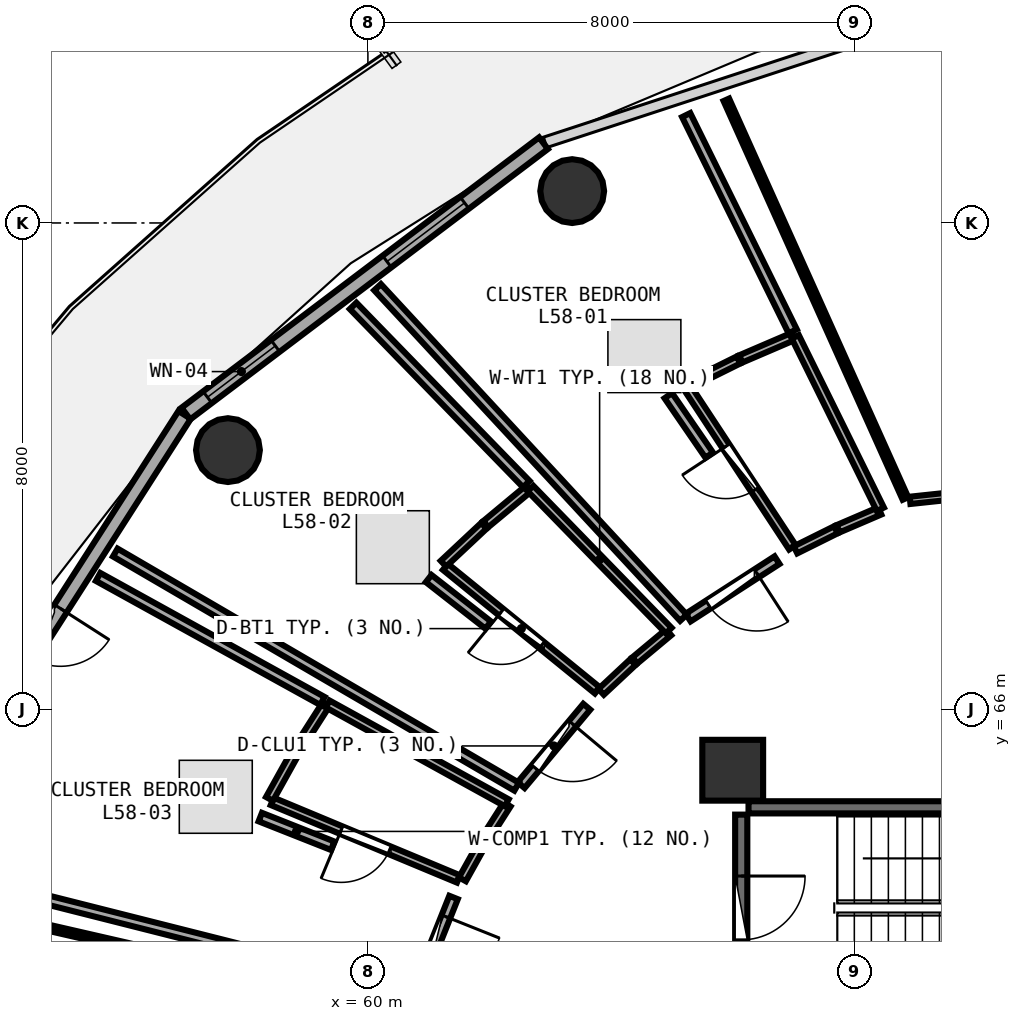
"""IFC4 building model, lengths in metres.
Left out: names, types, materials, properties, quantities, classifications, styles, units other than length and angle.
Written with IfcOpenShell. Run it as: python <this file> out.ifc"""

import sys

from ifc_helpers import new_model, si_unit, direction, frame, frame_2d, origin, origin_2d, place, context, subcontext, project, spatial, rectangle, circle, extrude, element, fill, save


model = new_model("IFC4")
c1 = context("Model", 3, precision=1e-05, world=origin(), true_north=direction((0.0, 1.0)))
c2 = subcontext(c1, "Body", "Model", "MODEL_VIEW")
j1 = project(units=[si_unit("LENGTHUNIT", "METRE"), si_unit("PLANEANGLEUNIT", "RADIAN")], contexts=[c1])
p1 = place(None, origin())
s1 = spatial("IfcSite", under=j1, at=p1, CompositionType="ELEMENT")
p2 = place(p1, origin())
s2 = spatial("IfcBuilding", under=s1, at=p2, CompositionType="ELEMENT")
p3 = place(p2, frame((0.0, 0.0, 226.95)))
s3 = spatial("IfcBuildingStorey", under=s2, at=p3, CompositionType="ELEMENT", Elevation=226.95)
p4 = place(p3, frame((66.0, 65.0, 0.0), z_axis=(0.0, 0.0, 1.0), x_axis=(1.0, 0.0, 0.0)))
e1 = element("IfcColumn", 1, at=p4, inside=s3, PredefinedType="PILASTER", context=c2, shape_type="SweptSolid", body=[
    extrude(rectangle(XDim=1.0, YDim=1.0, at=origin_2d()), origin(), (0.0, 0.0, 1.0), 3.75),
])
for number, where, z_axis, x_axis in (
    (2, (63.36, 74.524, 0.0), (0.0, 0.0, 1.0), (1.0, 0.0, 0.0)),
    (3, (57.698, 70.264, 0.0), (0.0, 0.0, 1.0), (1.0, 0.0, 0.0)),
):
    element("IfcColumn", number, at=place(p3, frame(where, z_axis=z_axis, x_axis=x_axis)), inside=s3, PredefinedType="COLUMN", context=c2, shape_type="SweptSolid", body=[
        extrude(circle(Radius=0.525, at=origin_2d()), origin(), (0.0, 0.0, 1.0), 3.75),
    ])
p5 = place(p3, frame((62.888, 75.312, 0.0), z_axis=(0.0, 0.0, 1.0), x_axis=(-0.797701674595, -0.603052268338, 0.0)))
e4 = element("IfcWall", 4, at=p5, inside=s3, PredefinedType="SOLIDWALL", context=c2, shape_type="SweptSolid", body=[
    extrude(rectangle(XDim=7.374, YDim=0.24, at=frame_2d((3.687, 0.0))), origin(), (0.0, 0.0, 1.0), 3.475),
])
p6 = place(p5, frame((1.627, 0.0, 0.85)))
e5 = element("IfcOpeningElement", 5, at=p6, cuts=e4, PredefinedType="OPENING", context=c2, shape_type="SweptSolid", body=[
    extrude(rectangle(XDim=1.6, YDim=1.45, at=frame_2d((0.8, 0.725))), frame((0.0, 0.13, 0.0), z_axis=(0.0, -1.0, 0.0), x_axis=(1.0, 0.0, 0.0)), (0.0, 0.0, 1.0), 0.26),
])
p7 = place(p5, frame((5.528, 0.0, 0.85)))
e6 = element("IfcOpeningElement", 6, at=p7, cuts=e4, PredefinedType="OPENING", context=c2, shape_type="SweptSolid", body=[
    extrude(rectangle(XDim=1.4, YDim=1.45, at=frame_2d((0.7, 0.725))), frame((0.0, 0.13, 0.0), z_axis=(0.0, -1.0, 0.0), x_axis=(1.0, 0.0, 0.0)), (0.0, 0.0, 1.0), 0.26),
])
p8 = place(p3, frame((56.986, 70.843, 0.0), z_axis=(0.0, 0.0, 1.0), x_axis=(-0.539539512973, -0.841960280501, 0.0)))
e7 = element("IfcWall", 7, at=p8, inside=s3, PredefinedType="SOLIDWALL", context=c2, shape_type="SweptSolid", body=[
    extrude(rectangle(XDim=7.115, YDim=0.24, at=frame_2d((3.557, 0.0))), origin(), (0.0, 0.0, 1.0), 3.475),
])
p9 = place(p8, frame((3.782, 0.0, 0.0)))
e8 = element("IfcOpeningElement", 8, at=p9, cuts=e7, PredefinedType="OPENING", context=c2, shape_type="SweptSolid", body=[
    extrude(rectangle(XDim=0.95, YDim=2.1, at=frame_2d((0.475, 1.05))), frame((0.0, 0.13, 0.0), z_axis=(0.0, -1.0, 0.0), x_axis=(1.0, 0.0, 0.0)), (0.0, 0.0, 1.0), 0.26),
])
p10 = place(p8, frame((5.082, 0.0, 0.85)))
e9 = element("IfcOpeningElement", 9, at=p10, cuts=e7, PredefinedType="OPENING", context=c2, shape_type="SweptSolid", body=[
    extrude(rectangle(XDim=1.2, YDim=1.45, at=frame_2d((0.6, 0.725))), frame((0.0, 0.13, 0.0), z_axis=(0.0, -1.0, 0.0), x_axis=(1.0, 0.0, 0.0)), (0.0, 0.0, 1.0), 0.26),
])
p11 = place(p3, frame((73.42, 64.39, 0.0), z_axis=(0.0, 0.0, 1.0), x_axis=(-1.0, 0.0, 0.0)))
e10 = element("IfcWall", 10, at=p11, inside=s3, PredefinedType="SHEAR", context=c2, shape_type="SweptSolid", body=[
    extrude(rectangle(XDim=7.16, YDim=0.2, at=frame_2d((3.58, 0.0))), origin(), (0.0, 0.0, 1.0), 3.49),
])
p12 = place(p3, frame((66.14, 64.27, 0.0), z_axis=(0.0, 0.0, 1.0), x_axis=(0.0, -1.0, 0.0)))
e11 = element("IfcWall", 11, at=p12, inside=s3, PredefinedType="SHEAR", context=c2, shape_type="SweptSolid", body=[
    extrude(rectangle(XDim=3.07, YDim=0.2, at=frame_2d((1.535, 0.0))), origin(), (0.0, 0.0, 1.0), 3.49),
])
p13 = place(p12, frame((1.01, 0.0, 0.0)))
e12 = element("IfcOpeningElement", 12, at=p13, cuts=e11, PredefinedType="OPENING", context=c2, shape_type="SweptSolid", body=[
    extrude(rectangle(XDim=1.05, YDim=2.1, at=frame_2d((0.525, 1.05))), frame((0.0, 0.11, 0.0), z_axis=(0.0, -1.0, 0.0), x_axis=(1.0, 0.0, 0.0)), (0.0, 0.0, 1.0), 0.22),
])
p14 = place(p3, frame((75.969, 70.189, 0.0), z_axis=(0.0, 0.0, 1.0), x_axis=(-0.994385599796, -0.105817195755, 0.0)))
e13 = element("IfcWall", 13, at=p14, inside=s3, PredefinedType="PARTITIONING", context=c2, shape_type="SweptSolid", body=[
    extrude(rectangle(XDim=7.092, YDim=0.12, at=frame_2d((3.546, 0.0))), origin(), (0.0, 0.0, 1.0), 3.025),
])
p15 = place(p14, frame((3.096, 0.0, 0.0)))
e14 = element("IfcOpeningElement", 14, at=p15, cuts=e13, PredefinedType="OPENING", context=c2, shape_type="SweptSolid", body=[
    extrude(rectangle(XDim=0.9, YDim=2.08, at=frame_2d((0.45, 1.04))), frame((0.0, 0.07, 0.0), z_axis=(0.0, -1.0, 0.0), x_axis=(1.0, 0.0, 0.0)), (0.0, 0.0, 1.0), 0.14),
])
p16 = place(p3, frame((66.982, 68.665, 0.0), z_axis=(0.0, 0.0, 1.0), x_axis=(-0.549630881336, 0.835407621632, 0.0)))
e15 = element("IfcWall", 15, at=p16, inside=s3, PredefinedType="PLUMBINGWALL", context=c2, shape_type="SweptSolid", body=[
    extrude(rectangle(XDim=3.118, YDim=0.13, at=frame_2d((1.559, 0.0))), origin(), (0.0, 0.0, 1.0), 3.175),
])
p17 = place(p16, frame((1.129, 0.0, 0.0)))
e16 = element("IfcOpeningElement", 16, at=p17, cuts=e15, PredefinedType="OPENING", context=c2, shape_type="SweptSolid", body=[
    extrude(rectangle(XDim=0.86, YDim=2.05, at=frame_2d((0.43, 1.025))), frame((0.0, 0.075, 0.0), z_axis=(0.0, -1.0, 0.0), x_axis=(1.0, 0.0, 0.0)), (0.0, 0.0, 1.0), 0.15),
])
p18 = place(p3, frame((66.729, 68.454, 0.0), z_axis=(0.0, 0.0, 1.0), x_axis=(-0.839995400075, -0.542593519915, 0.0)))
e17 = element("IfcWall", 17, at=p18, inside=s3, PredefinedType="PARTITIONING", context=c2, shape_type="SweptSolid", body=[
    extrude(rectangle(XDim=1.74, YDim=0.15, at=frame_2d((0.87, 0.0))), origin(), (0.0, 0.0, 1.0), 3.025),
])
p19 = place(p18, frame((0.395, 0.0, 0.0)))
e18 = element("IfcOpeningElement", 18, at=p19, cuts=e17, PredefinedType="OPENING", context=c2, shape_type="SweptSolid", body=[
    extrude(rectangle(XDim=0.95, YDim=2.08, at=frame_2d((0.475, 1.04))), frame((0.0, 0.085, 0.0), z_axis=(0.0, -1.0, 0.0), x_axis=(1.0, 0.0, 0.0)), (0.0, 0.0, 1.0), 0.17),
])
p20 = place(p3, frame((63.774, 66.313, 0.0), z_axis=(0.0, 0.0, 1.0), x_axis=(-0.775898386577, 0.630857902945, 0.0)))
e19 = element("IfcWall", 19, at=p20, inside=s3, PredefinedType="PLUMBINGWALL", context=c2, shape_type="SweptSolid", body=[
    extrude(rectangle(XDim=3.222, YDim=0.13, at=frame_2d((1.611, 0.0))), origin(), (0.0, 0.0, 1.0), 3.025),
])
p21 = place(p20, frame((1.181, 0.0, 0.0)))
e20 = element("IfcOpeningElement", 20, at=p21, cuts=e19, PredefinedType="OPENING", context=c2, shape_type="SweptSolid", body=[
    extrude(rectangle(XDim=0.86, YDim=2.05, at=frame_2d((0.43, 1.025))), frame((0.0, 0.075, 0.0), z_axis=(0.0, -1.0, 0.0), x_axis=(1.0, 0.0, 0.0)), (0.0, 0.0, 1.0), 0.15),
])
p22 = place(p3, frame((63.6, 66.044, 0.0), z_axis=(0.0, 0.0, 1.0), x_axis=(-0.642238304801, -0.766505029238, 0.0)))
e21 = element("IfcWall", 21, at=p22, inside=s3, PredefinedType="PARTITIONING", context=c2, shape_type="SweptSolid", body=[
    extrude(rectangle(XDim=1.682, YDim=0.15, at=frame_2d((0.841, 0.0))), origin(), (0.0, 0.0, 1.0), 3.025),
])
p23 = place(p22, frame((0.366, 0.0, 0.0)))
e22 = element("IfcOpeningElement", 22, at=p23, cuts=e21, PredefinedType="OPENING", context=c2, shape_type="SweptSolid", body=[
    extrude(rectangle(XDim=0.95, YDim=2.08, at=frame_2d((0.475, 1.04))), frame((0.0, 0.085, 0.0), z_axis=(0.0, -1.0, 0.0), x_axis=(1.0, 0.0, 0.0)), (0.0, 0.0, 1.0), 0.17),
])
p24 = place(p3, frame((61.49, 63.212, 0.0), z_axis=(0.0, 0.0, 1.0), x_axis=(-0.923098696922, 0.38456312322, 0.0)))
e23 = element("IfcWall", 23, at=p24, inside=s3, PredefinedType="PLUMBINGWALL", context=c2, shape_type="SweptSolid", body=[
    extrude(rectangle(XDim=3.317, YDim=0.13, at=frame_2d((1.659, 0.0))), origin(), (0.0, 0.0, 1.0), 3.175),
])
p25 = place(p24, frame((1.229, 0.0, 0.0)))
e24 = element("IfcOpeningElement", 24, at=p25, cuts=e23, PredefinedType="OPENING", context=c2, shape_type="SweptSolid", body=[
    extrude(rectangle(XDim=0.86, YDim=2.05, at=frame_2d((0.43, 1.025))), frame((0.0, 0.075, 0.0), z_axis=(0.0, -1.0, 0.0), x_axis=(1.0, 0.0, 0.0)), (0.0, 0.0, 1.0), 0.15),
])
p26 = place(p3, frame((61.409, 62.907, 0.0), z_axis=(0.0, 0.0, 1.0), x_axis=(-0.370667853418, -0.928765493783, 0.0)))
e25 = element("IfcWall", 25, at=p26, inside=s3, PredefinedType="PARTITIONING", context=c2, shape_type="SweptSolid", body=[
    extrude(rectangle(XDim=1.631, YDim=0.15, at=frame_2d((0.815, 0.0))), origin(), (0.0, 0.0, 1.0), 3.235),
])
p27 = place(p26, frame((0.34, 0.0, 0.0)))
e26 = element("IfcOpeningElement", 26, at=p27, cuts=e25, PredefinedType="OPENING", context=c2, shape_type="SweptSolid", body=[
    extrude(rectangle(XDim=0.95, YDim=2.08, at=frame_2d((0.475, 1.04))), frame((0.0, 0.085, 0.0), z_axis=(0.0, -1.0, 0.0), x_axis=(1.0, 0.0, 0.0)), (0.0, 0.0, 1.0), 0.17),
])
p28 = place(p3, frame((68.841, 69.469, 0.0), z_axis=(0.0, 0.0, 1.0), x_axis=(-0.409724811959, 0.912209174732, 0.0)))
e27 = element("IfcWall", 27, at=p28, inside=s3, PredefinedType="PARTITIONING", context=c2, shape_type="SweptSolid", body=[
    extrude(rectangle(XDim=7.188, YDim=0.1, at=frame_2d((3.594, 0.0))), origin(), (0.0, 0.0, 1.0), 3.075),
])
p29 = place(p3, frame((68.419, 69.265, 0.0), z_axis=(0.0, 0.0, 1.0), x_axis=(-0.918907807653, -0.394472357756, 0.0)))
e28 = element("IfcWall", 28, at=p29, inside=s3, PredefinedType="PLUMBINGWALL", context=c2, shape_type="SweptSolid", body=[
    extrude(rectangle(XDim=0.746, YDim=0.13, at=frame_2d((0.373, 0.0))), origin(), (0.0, 0.0, 1.0), 3.235),
])
p30 = place(p3, frame((67.697, 68.954, 0.0), z_axis=(0.0, 0.0, 1.0), x_axis=(-0.895346972175, -0.445369284321, 0.0)))
e29 = element("IfcWall", 29, at=p30, inside=s3, PredefinedType="PLUMBINGWALL", context=c2, shape_type="SweptSolid", body=[
    extrude(rectangle(XDim=0.742, YDim=0.13, at=frame_2d((0.371, 0.0))), origin(), (0.0, 0.0, 1.0), 3.235),
])
p31 = place(p3, frame((65.253, 71.329, 0.0), z_axis=(0.0, 0.0, 1.0), x_axis=(0.895874963303, 0.444306257133, 0.0)))
e30 = element("IfcWall", 30, at=p31, inside=s3, PredefinedType="PLUMBINGWALL", context=c2, shape_type="SweptSolid", body=[
    extrude(rectangle(XDim=0.941, YDim=0.13, at=frame_2d((0.471, 0.0))), origin(), (0.0, 0.0, 1.0), 3.48),
])
p32 = place(p3, frame((66.132, 71.764, 0.0), z_axis=(0.0, 0.0, 1.0), x_axis=(0.918877881794, 0.394542061573, 0.0)))
e31 = element("IfcWall", 31, at=p32, inside=s3, PredefinedType="PLUMBINGWALL", context=c2, shape_type="SweptSolid", body=[
    extrude(rectangle(XDim=0.946, YDim=0.13, at=frame_2d((0.473, 0.0))), origin(), (0.0, 0.0, 1.0), 3.48),
])
p33 = place(p3, frame((67.029, 72.127, 0.0), z_axis=(0.0, 0.0, 1.0), x_axis=(0.442483009424, -0.896776887732, 0.0)))
e32 = element("IfcWall", 32, at=p33, inside=s3, PredefinedType="PLUMBINGWALL", context=c2, shape_type="SweptSolid", body=[
    extrude(rectangle(XDim=3.163, YDim=0.13, at=frame_2d((1.581, 0.0))), origin(), (0.0, 0.0, 1.0), 3.175),
])
p34 = place(p3, frame((65.19, 67.507, 0.0), z_axis=(0.0, 0.0, 1.0), x_axis=(-0.679184519722, 0.733967566157, 0.0)))
e33 = element("IfcWall", 33, at=p34, inside=s3, PredefinedType="PARTITIONING", context=c2, shape_type="SweptSolid", body=[
    extrude(rectangle(XDim=7.407, YDim=0.15, at=frame_2d((3.703, 0.0))), origin(), (0.0, 0.0, 1.0), 3.025),
])
p35 = place(p3, frame((65.235, 75.774, 0.0), z_axis=(0.0, 0.0, 1.0), x_axis=(0.441884590329, -0.897071908394, 0.0)))
e34 = element("IfcWall", 34, at=p35, inside=s3, PredefinedType="PARTITIONING", context=c2, shape_type="SweptSolid", body=[
    extrude(rectangle(XDim=3.964, YDim=0.15, at=frame_2d((1.982, 0.0))), origin(), (0.0, 0.0, 1.0), 3.075),
])
p36 = place(p3, frame((64.941, 71.16, 0.0), z_axis=(0.0, 0.0, 1.0), x_axis=(0.566694618131, -0.823927915403, 0.0)))
e35 = element("IfcWall", 35, at=p36, inside=s3, PredefinedType="PARTITIONING", context=c2, shape_type="SweptSolid", body=[
    extrude(rectangle(XDim=1.187, YDim=0.15, at=frame_2d((0.594, 0.0))), origin(), (0.0, 0.0, 1.0), 3.175),
])
p37 = place(p3, frame((64.947, 67.269, 0.0), z_axis=(0.0, 0.0, 1.0), x_axis=(-0.768276565134, -0.640118051196, 0.0)))
e36 = element("IfcWall", 36, at=p37, inside=s3, PredefinedType="PLUMBINGWALL", context=c2, shape_type="SweptSolid", body=[
    extrude(rectangle(XDim=0.724, YDim=0.13, at=frame_2d((0.362, 0.0))), origin(), (0.0, 0.0, 1.0), 3.48),
])
p38 = place(p3, frame((64.36, 66.779, 0.0), z_axis=(0.0, 0.0, 1.0), x_axis=(-0.73050113357, -0.682911483175, 0.0)))
e37 = element("IfcWall", 37, at=p38, inside=s3, PredefinedType="PLUMBINGWALL", context=c2, shape_type="SweptSolid", body=[
    extrude(rectangle(XDim=0.718, YDim=0.13, at=frame_2d((0.359, 0.0))), origin(), (0.0, 0.0, 1.0), 3.025),
])
p39 = place(p3, frame((61.243, 68.397, 0.0), z_axis=(0.0, 0.0, 1.0), x_axis=(0.729879325393, 0.683576016522, 0.0)))
e38 = element("IfcWall", 38, at=p39, inside=s3, PredefinedType="PLUMBINGWALL", context=c2, shape_type="SweptSolid", body=[
    extrude(rectangle(XDim=0.912, YDim=0.13, at=frame_2d((0.456, 0.0))), origin(), (0.0, 0.0, 1.0), 3.175),
])
p40 = place(p3, frame((61.938, 69.047, 0.0), z_axis=(0.0, 0.0, 1.0), x_axis=(0.768743942807, 0.639556682709, 0.0)))
e39 = element("IfcWall", 39, at=p40, inside=s3, PredefinedType="PLUMBINGWALL", context=c2, shape_type="SweptSolid", body=[
    extrude(rectangle(XDim=0.918, YDim=0.13, at=frame_2d((0.459, 0.0))), origin(), (0.0, 0.0, 1.0), 3.175),
])
p41 = place(p3, frame((62.674, 69.633, 0.0), z_axis=(0.0, 0.0, 1.0), x_axis=(0.697495291355, -0.716589365353, 0.0)))
e40 = element("IfcWall", 40, at=p41, inside=s3, PredefinedType="PLUMBINGWALL", context=c2, shape_type="SweptSolid", body=[
    extrude(rectangle(XDim=3.26, YDim=0.13, at=frame_2d((1.63, 0.0))), origin(), (0.0, 0.0, 1.0), 3.175),
])
p42 = place(p3, frame((62.446, 64.729, 0.0), z_axis=(0.0, 0.0, 1.0), x_axis=(-0.863764995437, 0.503894862703, 0.0)))
e41 = element("IfcWall", 41, at=p42, inside=s3, PredefinedType="PARTITIONING", context=c2, shape_type="SweptSolid", body=[
    extrude(rectangle(XDim=7.642, YDim=0.15, at=frame_2d((3.821, 0.0))), origin(), (0.0, 0.0, 1.0), 3.025),
])
p43 = place(p3, frame((59.757, 72.636, 0.0), z_axis=(0.0, 0.0, 1.0), x_axis=(0.696968329913, -0.717101908447, 0.0)))
e42 = element("IfcWall", 42, at=p43, inside=s3, PredefinedType="PARTITIONING", context=c2, shape_type="SweptSolid", body=[
    extrude(rectangle(XDim=4.086, YDim=0.15, at=frame_2d((2.043, 0.0))), origin(), (0.0, 0.0, 1.0), 3.075),
])
p44 = place(p3, frame((61.0, 68.152, 0.0), z_axis=(0.0, 0.0, 1.0), x_axis=(0.787890342656, -0.615815563257, 0.0)))
e43 = element("IfcWall", 43, at=p44, inside=s3, PredefinedType="PARTITIONING", context=c2, shape_type="SweptSolid", body=[
    extrude(rectangle(XDim=1.243, YDim=0.15, at=frame_2d((0.622, 0.0))), origin(), (0.0, 0.0, 1.0), 3.025),
])
p45 = place(p3, frame((62.291, 64.438, 0.0), z_axis=(0.0, 0.0, 1.0), x_axis=(-0.538677920136, -0.842511779359, 0.0)))
e44 = element("IfcWall", 44, at=p45, inside=s3, PredefinedType="PLUMBINGWALL", context=c2, shape_type="SweptSolid", body=[
    extrude(rectangle(XDim=0.701, YDim=0.13, at=frame_2d((0.35, 0.0))), origin(), (0.0, 0.0, 1.0), 3.48),
])
p46 = place(p3, frame((61.893, 63.813, 0.0), z_axis=(0.0, 0.0, 1.0), x_axis=(-0.487222889134, -0.873277651325, 0.0)))
e45 = element("IfcWall", 45, at=p46, inside=s3, PredefinedType="PLUMBINGWALL", context=c2, shape_type="SweptSolid", body=[
    extrude(rectangle(XDim=0.695, YDim=0.13, at=frame_2d((0.348, 0.0))), origin(), (0.0, 0.0, 1.0), 3.48),
])
p47 = place(p3, frame((58.382, 64.529, 0.0), z_axis=(0.0, 0.0, 1.0), x_axis=(0.486816740093, 0.873504127961, 0.0)))
e46 = element("IfcWall", 46, at=p47, inside=s3, PredefinedType="PLUMBINGWALL", context=c2, shape_type="SweptSolid", body=[
    extrude(rectangle(XDim=0.883, YDim=0.13, at=frame_2d((0.441, 0.0))), origin(), (0.0, 0.0, 1.0), 3.025),
])
p48 = place(p3, frame((58.832, 65.334, 0.0), z_axis=(0.0, 0.0, 1.0), x_axis=(0.538866442337, 0.84239121394, 0.0)))
e47 = element("IfcWall", 47, at=p48, inside=s3, PredefinedType="PLUMBINGWALL", context=c2, shape_type="SweptSolid", body=[
    extrude(rectangle(XDim=0.888, YDim=0.13, at=frame_2d((0.444, 0.0))), origin(), (0.0, 0.0, 1.0), 3.48),
])
p49 = place(p3, frame((59.338, 66.089, 0.0), z_axis=(0.0, 0.0, 1.0), x_axis=(0.875659168238, -0.482929623322, 0.0)))
e48 = element("IfcWall", 48, at=p49, inside=s3, PredefinedType="PLUMBINGWALL", context=c2, shape_type="SweptSolid", body=[
    extrude(rectangle(XDim=3.364, YDim=0.13, at=frame_2d((1.682, 0.0))), origin(), (0.0, 0.0, 1.0), 3.025),
])
p50 = place(p3, frame((60.743, 61.347, 0.0), z_axis=(0.0, 0.0, 1.0), x_axis=(-0.969516227032, 0.245027111811, 0.0)))
e49 = element("IfcWall", 49, at=p50, inside=s3, PredefinedType="PARTITIONING", context=c2, shape_type="SweptSolid", body=[
    extrude(rectangle(XDim=7.814, YDim=0.15, at=frame_2d((3.907, 0.0))), origin(), (0.0, 0.0, 1.0), 3.075),
])
p51 = place(p3, frame((55.563, 68.179, 0.0), z_axis=(0.0, 0.0, 1.0), x_axis=(0.875174419458, -0.483807539757, 0.0)))
e50 = element("IfcWall", 50, at=p51, inside=s3, PredefinedType="PARTITIONING", context=c2, shape_type="SweptSolid", body=[
    extrude(rectangle(XDim=4.215, YDim=0.15, at=frame_2d((2.107, 0.0))), origin(), (0.0, 0.0, 1.0), 3.075),
])
p52 = place(p3, frame((58.23, 64.229, 0.0), z_axis=(0.0, 0.0, 1.0), x_axis=(0.929889476553, -0.367839042785, 0.0)))
e51 = element("IfcWall", 51, at=p52, inside=s3, PredefinedType="PARTITIONING", context=c2, shape_type="SweptSolid", body=[
    extrude(rectangle(XDim=1.281, YDim=0.15, at=frame_2d((0.641, 0.0))), origin(), (0.0, 0.0, 1.0), 3.175),
])
p53 = place(p3, frame((53.031, 62.803, 0.0), z_axis=(0.0, 0.0, 1.0), x_axis=(0.974686998683, -0.223573823597, 0.0)))
e52 = element("IfcWall", 52, at=p53, inside=s3, PredefinedType="PARTITIONING", context=c2, shape_type="SweptSolid", body=[
    extrude(rectangle(XDim=7.823, YDim=0.1, at=frame_2d((3.912, 0.0))), origin(), (0.0, 0.0, 1.0), 3.075),
])
p54 = place(p6, origin())
e53 = element("IfcWindow", 53, at=p54, inside=s3, PartitioningType="SINGLE_PANEL", PredefinedType="WINDOW", context=c2, shape_type="SweptSolid", body=[
    extrude(rectangle(XDim=1.6, YDim=1.45, at=frame_2d((0.8, 0.725))), frame((0.0, 0.03, 0.0), z_axis=(0.0, -1.0, 0.0), x_axis=(1.0, 0.0, 0.0)), (0.0, 0.0, 1.0), 0.06),
])
fill(e5, e53)
p55 = place(p9, frame((0.95, 0.0, 0.0), z_axis=(0.0, 0.0, 1.0), x_axis=(-1.0, 0.0, 0.0)))
e54 = element("IfcDoor", 54, at=p55, inside=s3, OperationType="SINGLE_SWING_RIGHT", PredefinedType="DOOR", context=c2, shape_type="SweptSolid", body=[
    extrude(rectangle(XDim=0.95, YDim=2.1, at=frame_2d((0.475, 1.05))), frame((0.0, 0.025, 0.0), z_axis=(0.0, -1.0, 0.0), x_axis=(1.0, 0.0, 0.0)), (0.0, 0.0, 1.0), 0.05),
])
fill(e8, e54)
p56 = place(p7, origin())
e55 = element("IfcWindow", 55, at=p56, inside=s3, PartitioningType="SINGLE_PANEL", PredefinedType="WINDOW", context=c2, shape_type="SweptSolid", body=[
    extrude(rectangle(XDim=1.4, YDim=1.45, at=frame_2d((0.7, 0.725))), frame((0.0, 0.03, 0.0), z_axis=(0.0, -1.0, 0.0), x_axis=(1.0, 0.0, 0.0)), (0.0, 0.0, 1.0), 0.06),
])
fill(e6, e55)
p57 = place(p13, origin())
e56 = element("IfcDoor", 56, at=p57, inside=s3, OperationType="SINGLE_SWING_LEFT", PredefinedType="DOOR", context=c2, shape_type="SweptSolid", body=[
    extrude(rectangle(XDim=1.05, YDim=2.1, at=frame_2d((0.525, 1.05))), frame((0.0, 0.025, 0.0), z_axis=(0.0, -1.0, 0.0), x_axis=(1.0, 0.0, 0.0)), (0.0, 0.0, 1.0), 0.05),
])
fill(e12, e56)
p58 = place(p17, origin())
e57 = element("IfcDoor", 57, at=p58, inside=s3, OperationType="SINGLE_SWING_RIGHT", PredefinedType="DOOR", context=c2, shape_type="SweptSolid", body=[
    extrude(rectangle(XDim=0.86, YDim=2.05, at=frame_2d((0.43, 1.025))), frame((0.0, 0.025, 0.0), z_axis=(0.0, -1.0, 0.0), x_axis=(1.0, 0.0, 0.0)), (0.0, 0.0, 1.0), 0.05),
])
fill(e16, e57)
p59 = place(p19, origin())
e58 = element("IfcDoor", 58, at=p59, inside=s3, OperationType="SINGLE_SWING_LEFT", PredefinedType="DOOR", context=c2, shape_type="SweptSolid", body=[
    extrude(rectangle(XDim=0.95, YDim=2.08, at=frame_2d((0.475, 1.04))), frame((0.0, 0.025, 0.0), z_axis=(0.0, -1.0, 0.0), x_axis=(1.0, 0.0, 0.0)), (0.0, 0.0, 1.0), 0.05),
])
fill(e18, e58)
p60 = place(p21, origin())
e59 = element("IfcDoor", 59, at=p60, inside=s3, OperationType="SINGLE_SWING_RIGHT", PredefinedType="DOOR", context=c2, shape_type="SweptSolid", body=[
    extrude(rectangle(XDim=0.86, YDim=2.05, at=frame_2d((0.43, 1.025))), frame((0.0, 0.025, 0.0), z_axis=(0.0, -1.0, 0.0), x_axis=(1.0, 0.0, 0.0)), (0.0, 0.0, 1.0), 0.05),
])
fill(e20, e59)
p61 = place(p23, origin())
e60 = element("IfcDoor", 60, at=p61, inside=s3, OperationType="SINGLE_SWING_LEFT", PredefinedType="DOOR", context=c2, shape_type="SweptSolid", body=[
    extrude(rectangle(XDim=0.95, YDim=2.08, at=frame_2d((0.475, 1.04))), frame((0.0, 0.025, 0.0), z_axis=(0.0, -1.0, 0.0), x_axis=(1.0, 0.0, 0.0)), (0.0, 0.0, 1.0), 0.05),
])
fill(e22, e60)
p62 = place(p25, origin())
e61 = element("IfcDoor", 61, at=p62, inside=s3, OperationType="SINGLE_SWING_RIGHT", PredefinedType="DOOR", context=c2, shape_type="SweptSolid", body=[
    extrude(rectangle(XDim=0.86, YDim=2.05, at=frame_2d((0.43, 1.025))), frame((0.0, 0.025, 0.0), z_axis=(0.0, -1.0, 0.0), x_axis=(1.0, 0.0, 0.0)), (0.0, 0.0, 1.0), 0.05),
])
fill(e24, e61)
p63 = place(p27, origin())
e62 = element("IfcDoor", 62, at=p63, inside=s3, OperationType="SINGLE_SWING_LEFT", PredefinedType="DOOR", context=c2, shape_type="SweptSolid", body=[
    extrude(rectangle(XDim=0.95, YDim=2.08, at=frame_2d((0.475, 1.04))), frame((0.0, 0.025, 0.0), z_axis=(0.0, -1.0, 0.0), x_axis=(1.0, 0.0, 0.0)), (0.0, 0.0, 1.0), 0.05),
])
fill(e26, e62)
save(model, sys.argv[1])
